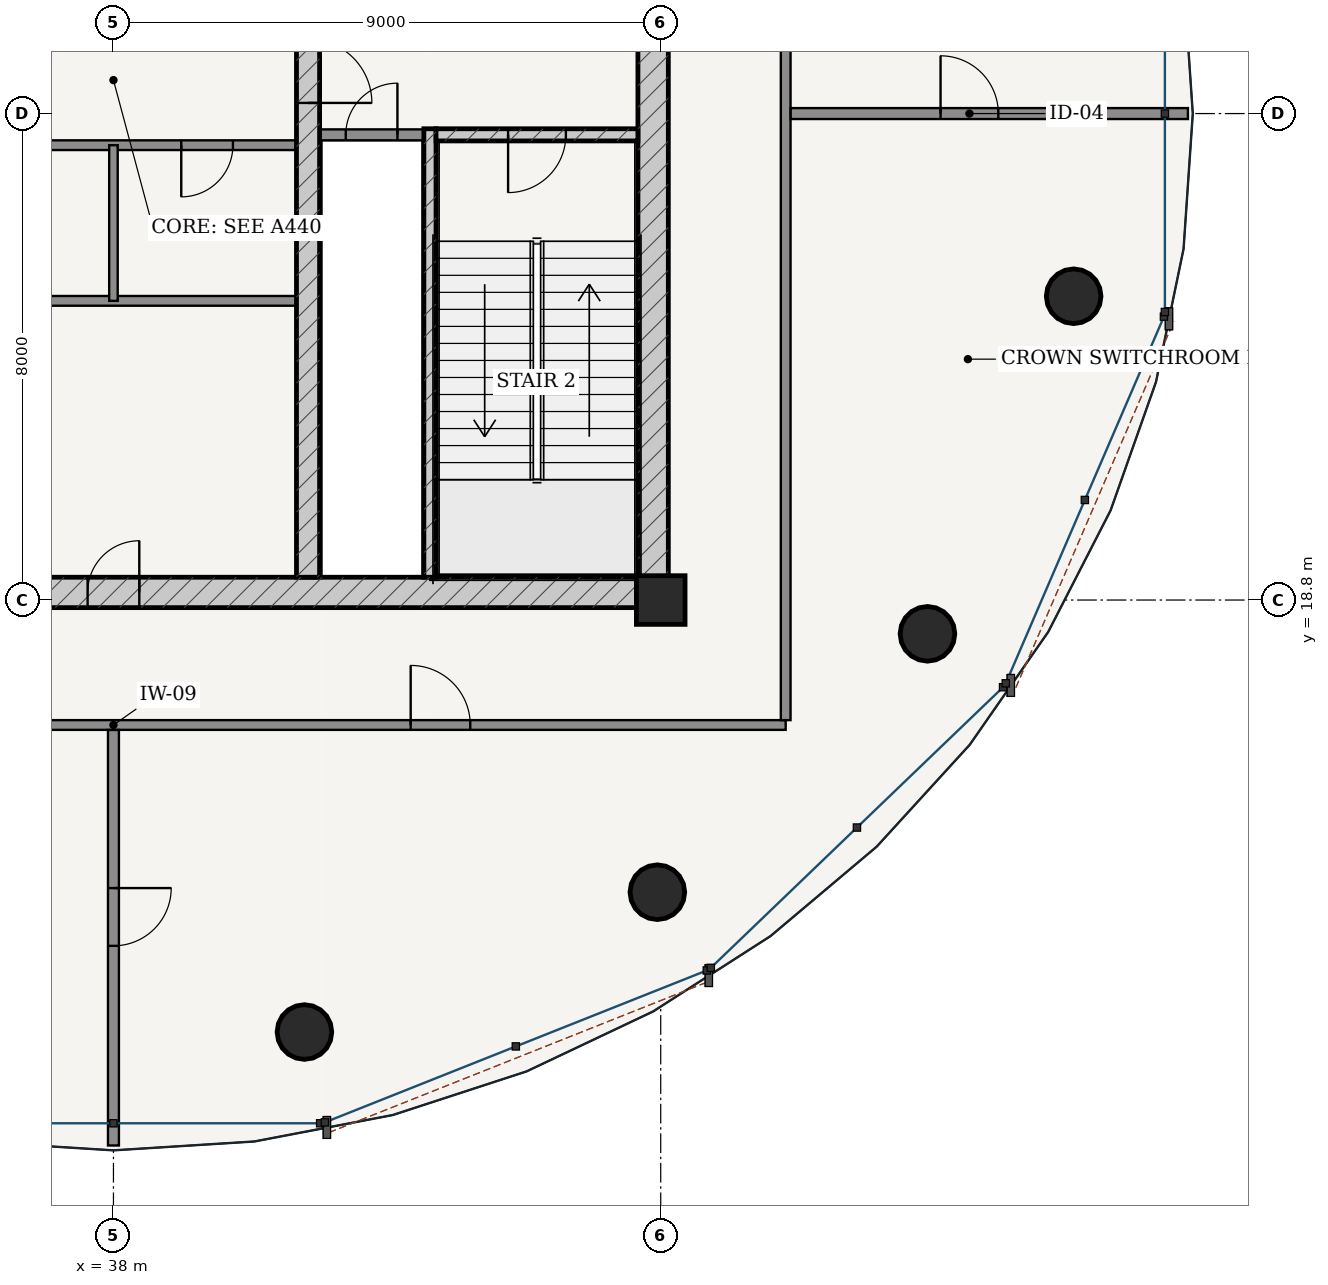
"""IFC4 building model, lengths in metres.
Left out: names, types, materials, properties, quantities, classifications, styles, units other than length and angle.
Written with IfcOpenShell. Run it as: python <this file> out.ifc"""

import sys

from ifc_helpers import new_model, si_unit, direction, frame, frame_2d, origin, origin_2d, place, context, subcontext, project, spatial, rectangle, hollow_circle, extrude, source, transform, mapped, element, fill, save


model = new_model("IFC4")
c1 = context("Model", 3, precision=1e-05, world=origin(), true_north=direction((-0.2419218956, 0.970295726276)))
c2 = subcontext(c1, "Body", "Model", "MODEL_VIEW")
j1 = project(units=[si_unit("LENGTHUNIT", "METRE"), si_unit("PLANEANGLEUNIT", "RADIAN")], contexts=[c1])
p1 = place(None, origin())
s1 = spatial("IfcSite", under=j1, at=p1, CompositionType="ELEMENT")
p2 = place(p1, origin())
s2 = spatial("IfcBuilding", under=s1, at=p2, CompositionType="ELEMENT")
p3 = place(p2, frame((0.0, 0.0, 311.3)))
s3 = spatial("IfcBuildingStorey", under=s2, at=p3, CompositionType="ELEMENT", Elevation=311.3)
p4 = place(p3, frame((47.0, 18.8, 0.0), z_axis=(0.0, 0.0, 1.0), x_axis=(1.0, 0.0, 0.0)))
e1 = element("IfcColumn", 1, at=p4, inside=s3, PredefinedType="COLUMN", context=c2, shape_type="SweptSolid", body=[
    extrude(rectangle(XDim=0.8, YDim=0.8, at=origin_2d()), origin(), (0.0, 0.0, 1.0), 5.2),
])
p5 = place(p3, frame((28.875, 18.925, 0.0), z_axis=(0.0, 0.0, 1.0), x_axis=(1.0, 0.0, 0.0)))
e2 = element("IfcWall", 2, at=p5, inside=s3, PredefinedType="SHEAR", context=c2, shape_type="SweptSolid", body=[
    extrude(rectangle(XDim=18.25, YDim=0.5, at=frame_2d((9.125, 0.0))), origin(), (0.0, 0.0, 1.0), 4.78),
])
p6 = place(p5, frame((8.7, 0.0, 0.0)))
e3 = element("IfcOpeningElement", 3, at=p6, cuts=e2, PredefinedType="OPENING", context=c2, shape_type="SweptSolid", body=[
    extrude(rectangle(XDim=0.85, YDim=2.1, at=frame_2d((0.425, 1.05))), frame((0.0, 0.26, 0.0), z_axis=(0.0, -1.0, 0.0), x_axis=(1.0, 0.0, 0.0)), (0.0, 0.0, 1.0), 0.52),
])
p7 = place(p3, frame((46.875, 19.175, 0.0), z_axis=(0.0, 0.0, 1.0), x_axis=(0.0, 1.0, 0.0)))
e4 = element("IfcWall", 4, at=p7, inside=s3, PredefinedType="SHEAR", context=c2, shape_type="SweptSolid", body=[
    extrude(rectangle(XDim=15.25, YDim=0.5, at=frame_2d((7.625, 0.0))), origin(), (0.0, 0.0, 1.0), 4.78),
])
p8 = place(p7, frame((9.875, 0.0, 0.0)))
e5 = element("IfcOpeningElement", 5, at=p8, cuts=e4, PredefinedType="OPENING", context=c2, shape_type="SweptSolid", body=[
    extrude(rectangle(XDim=1.5, YDim=2.2, at=frame_2d((0.75, 1.1))), frame((0.0, 0.26, 0.0), z_axis=(0.0, -1.0, 0.0), x_axis=(1.0, 0.0, 0.0)), (0.0, 0.0, 1.0), 0.52),
])
p9 = place(p3, frame((43.205, 19.175, 0.0), z_axis=(0.0, 0.0, 1.0), x_axis=(0.0, 1.0, 0.0)))
e6 = element("IfcWall", 6, at=p9, inside=s3, PredefinedType="SOLIDWALL", context=c2, shape_type="SweptSolid", body=[
    extrude(rectangle(XDim=7.375, YDim=0.2, at=frame_2d((3.688, 0.0))), origin(), (0.0, 0.0, 1.0), 4.78),
])
p10 = place(p3, frame((43.305, 26.45, 0.0), z_axis=(0.0, 0.0, 1.0), x_axis=(1.0, 0.0, 0.0)))
e7 = element("IfcWall", 7, at=p10, inside=s3, PredefinedType="SOLIDWALL", context=c2, shape_type="SweptSolid", body=[
    extrude(rectangle(XDim=3.32, YDim=0.2, at=frame_2d((1.66, 0.0))), origin(), (0.0, 0.0, 1.0), 4.78),
])
p11 = place(p10, frame((1.185, 0.0, 0.0)))
e8 = element("IfcOpeningElement", 8, at=p11, cuts=e7, PredefinedType="OPENING", context=c2, shape_type="SweptSolid", body=[
    extrude(rectangle(XDim=0.95, YDim=2.15, at=frame_2d((0.475, 1.075))), frame((0.0, 0.11, 0.0), z_axis=(0.0, -1.0, 0.0), x_axis=(1.0, 0.0, 0.0)), (0.0, 0.0, 1.0), 0.22),
])
p12 = place(p3, frame((41.2, 19.175, 0.0), z_axis=(0.0, 0.0, 1.0), x_axis=(0.0, 1.0, 0.0)))
e9 = element("IfcWall", 9, at=p12, inside=s3, PredefinedType="SHEAR", context=c2, shape_type="SweptSolid", body=[
    extrude(rectangle(XDim=15.25, YDim=0.38, at=frame_2d((7.625, 0.0))), origin(), (0.0, 0.0, 1.0), 4.78),
])
p13 = place(p12, frame((7.8, 0.0, 0.0)))
e10 = element("IfcOpeningElement", 10, at=p13, cuts=e9, PredefinedType="OPENING", context=c2, shape_type="SweptSolid", body=[
    extrude(rectangle(XDim=1.05, YDim=2.15, at=frame_2d((0.525, 1.075))), frame((0.0, 0.2, 0.0), z_axis=(0.0, -1.0, 0.0), x_axis=(1.0, 0.0, 0.0)), (0.0, 0.0, 1.0), 0.4),
])
for number, where, z_axis, x_axis in (
    (11, (41.141, 11.696, 0.0), (0.0, 0.0, 1.0), (1.0, 0.0, 0.0)),
    (12, (46.945, 13.995, 0.0), (0.0, 0.0, 1.0), (1.0, 0.0, 0.0)),
    (13, (51.387, 18.244, 0.0), (0.0, 0.0, 1.0), (1.0, 0.0, 0.0)),
    (14, (53.791, 23.796, 0.0), (0.0, 0.0, 1.0), (1.0, 0.0, 0.0)),
):
    element("IfcColumn", number, at=place(p3, frame(where, z_axis=z_axis, x_axis=x_axis)), inside=s3, PredefinedType="COLUMN", context=c2, shape_type="SweptSolid", body=[
        extrude(hollow_circle(Radius=0.45, WallThickness=0.032, at=origin_2d()), origin(), (0.0, 0.0, 1.0), 5.2),
    ])
p14 = place(p3, frame((41.39, 26.45, 0.0), z_axis=(0.0, 0.0, 1.0), x_axis=(1.0, 0.0, 0.0)))
e15 = element("IfcWall", 15, at=p14, inside=s3, PredefinedType="PARTITIONING", context=c2, shape_type="SweptSolid", body=[
    extrude(rectangle(XDim=1.71, YDim=0.18, at=frame_2d((0.855, 0.0))), origin(), (0.0, 0.0, 1.0), 4.78),
])
p15 = place(p14, frame((0.43, 0.0, 0.0)))
e16 = element("IfcOpeningElement", 16, at=p15, cuts=e15, PredefinedType="OPENING", context=c2, shape_type="SweptSolid", body=[
    extrude(rectangle(XDim=0.85, YDim=2.1, at=frame_2d((0.425, 1.05))), frame((0.0, 0.1, 0.0), z_axis=(0.0, -1.0, 0.0), x_axis=(1.0, 0.0, 0.0)), (0.0, 0.0, 1.0), 0.2),
])
p16 = place(p3, frame((34.99, 26.28, 0.0), z_axis=(0.0, 0.0, 1.0), x_axis=(1.0, 0.0, 0.0)))
e17 = element("IfcWall", 17, at=p16, inside=s3, PredefinedType="PARTITIONING", context=c2, shape_type="SweptSolid", body=[
    extrude(rectangle(XDim=6.02, YDim=0.16, at=frame_2d((3.01, 0.0))), origin(), (0.0, 0.0, 1.0), 4.78),
])
p17 = place(p16, frame((1.045, 0.0, 0.0)))
e18 = element("IfcOpeningElement", 18, at=p17, cuts=e17, PredefinedType="OPENING", context=c2, shape_type="SweptSolid", body=[
    extrude(rectangle(XDim=0.85, YDim=2.1, at=frame_2d((0.425, 1.05))), frame((0.0, 0.09, 0.0), z_axis=(0.0, -1.0, 0.0), x_axis=(1.0, 0.0, 0.0)), (0.0, 0.0, 1.0), 0.18),
])
p18 = place(p16, frame((4.125, 0.0, 0.0)))
e19 = element("IfcOpeningElement", 19, at=p18, cuts=e17, PredefinedType="OPENING", context=c2, shape_type="SweptSolid", body=[
    extrude(rectangle(XDim=0.85, YDim=2.1, at=frame_2d((0.425, 1.05))), frame((0.0, 0.09, 0.0), z_axis=(0.0, -1.0, 0.0), x_axis=(1.0, 0.0, 0.0)), (0.0, 0.0, 1.0), 0.18),
])
p19 = place(p3, frame((34.99, 23.72, 0.0), z_axis=(0.0, 0.0, 1.0), x_axis=(1.0, 0.0, 0.0)))
e20 = element("IfcWall", 20, at=p19, inside=s3, PredefinedType="PARTITIONING", context=c2, shape_type="SweptSolid", body=[
    extrude(rectangle(XDim=6.02, YDim=0.16, at=frame_2d((3.01, 0.0))), origin(), (0.0, 0.0, 1.0), 4.78),
])
p20 = place(p3, frame((38.0, 23.72, 0.0), z_axis=(0.0, 0.0, 1.0), x_axis=(0.0, 1.0, 0.0)))
e21 = element("IfcWall", 21, at=p20, inside=s3, PredefinedType="PARTITIONING", context=c2, shape_type="SweptSolid", body=[
    extrude(rectangle(XDim=2.56, YDim=0.14, at=frame_2d((1.28, 0.0))), origin(), (0.0, 0.0, 1.0), 4.78),
])
p21 = place(p3, frame((26.945, 16.745, 0.0), z_axis=(0.0, 0.0, 1.0), x_axis=(1.0, 0.0, 0.0)))
e22 = element("IfcWall", 22, at=p21, inside=s3, PredefinedType="PARTITIONING", context=c2, shape_type="SweptSolid", body=[
    extrude(rectangle(XDim=22.11, YDim=0.16, at=frame_2d((11.055, 0.0))), origin(), (0.0, 0.0, 1.0), 4.352),
])
p22 = place(p21, frame((5.187, 0.0, 0.0)))
e23 = element("IfcOpeningElement", 23, at=p22, cuts=e22, PredefinedType="OPENING", context=c2, shape_type="SweptSolid", body=[
    extrude(rectangle(XDim=0.98, YDim=2.2, at=frame_2d((0.49, 1.1))), frame((0.0, 0.09, 0.0), z_axis=(0.0, -1.0, 0.0), x_axis=(1.0, 0.0, 0.0)), (0.0, 0.0, 1.0), 0.18),
])
p23 = place(p21, frame((15.943, 0.0, 0.0)))
e24 = element("IfcOpeningElement", 24, at=p23, cuts=e22, PredefinedType="OPENING", context=c2, shape_type="SweptSolid", body=[
    extrude(rectangle(XDim=0.98, YDim=2.2, at=frame_2d((0.49, 1.1))), frame((0.0, 0.09, 0.0), z_axis=(0.0, -1.0, 0.0), x_axis=(1.0, 0.0, 0.0)), (0.0, 0.0, 1.0), 0.18),
])
p24 = place(p3, frame((49.055, 16.825, 0.0), z_axis=(0.0, 0.0, 1.0), x_axis=(0.0, 1.0, 0.0)))
e25 = element("IfcWall", 25, at=p24, inside=s3, PredefinedType="PARTITIONING", context=c2, shape_type="SweptSolid", body=[
    extrude(rectangle(XDim=19.95, YDim=0.16, at=frame_2d((9.975, 0.0))), origin(), (0.0, 0.0, 1.0), 4.352),
])
p25 = place(p3, frame((49.137, 26.8, 0.0), z_axis=(0.0, 0.0, 1.0), x_axis=(1.0, 0.0, 0.0)))
e26 = element("IfcWall", 26, at=p25, inside=s3, PredefinedType="PARTITIONING", context=c2, shape_type="SweptSolid", body=[
    extrude(rectangle(XDim=6.533, YDim=0.18, at=frame_2d((3.267, 0.0))), origin(), (0.0, 0.0, 1.0), 4.411),
])
p26 = place(p25, frame((2.465, 0.0, 0.0)))
e27 = element("IfcOpeningElement", 27, at=p26, cuts=e26, PredefinedType="OPENING", context=c2, shape_type="SweptSolid", body=[
    extrude(rectangle(XDim=0.95, YDim=2.15, at=frame_2d((0.475, 1.075))), frame((0.0, 0.1, 0.0), z_axis=(0.0, -1.0, 0.0), x_axis=(1.0, 0.0, 0.0)), (0.0, 0.0, 1.0), 0.2),
])
p27 = place(p3, frame((38.0, 16.663, 0.0), z_axis=(0.0, 0.0, 1.0), x_axis=(0.0, -1.0, 0.0)))
e28 = element("IfcWall", 28, at=p27, inside=s3, PredefinedType="PARTITIONING", context=c2, shape_type="SweptSolid", body=[
    extrude(rectangle(XDim=6.833, YDim=0.18, at=frame_2d((3.417, 0.0))), origin(), (0.0, 0.0, 1.0), 4.411),
])
p28 = place(p27, frame((2.6, 0.0, 0.0)))
e29 = element("IfcOpeningElement", 29, at=p28, cuts=e28, PredefinedType="OPENING", context=c2, shape_type="SweptSolid", body=[
    extrude(rectangle(XDim=0.95, YDim=2.15, at=frame_2d((0.475, 1.075))), frame((0.0, 0.1, 0.0), z_axis=(0.0, -1.0, 0.0), x_axis=(1.0, 0.0, 0.0)), (0.0, 0.0, 1.0), 0.2),
])
m1 = source(origin(), c2, "Body", "SweptSolid", [
    extrude(rectangle(XDim=1.05, YDim=2.15, at=frame_2d((0.525, 1.075))), frame((0.0, 0.025, 0.0), z_axis=(0.0, -1.0, 0.0), x_axis=(1.0, 0.0, 0.0)), (0.0, 0.0, 1.0), 0.05),
])
p29 = place(p13, frame((1.05, 0.0, 0.0), z_axis=(0.0, 0.0, 1.0), x_axis=(-1.0, 0.0, 0.0)))
e30 = element("IfcDoor", 30, at=p29, inside=s3, OperationType="SINGLE_SWING_RIGHT", PredefinedType="DOOR", context=c2, shape_type="MappedRepresentation", body=[
    mapped(m1, transform((0.0, 0.0, 0.0), scale=1.0)),
])
fill(e10, e30)
m2 = source(origin(), c2, "Body", "SweptSolid", [
    extrude(rectangle(XDim=0.95, YDim=2.15, at=frame_2d((0.475, 1.075))), frame((0.0, 0.025, 0.0), z_axis=(0.0, -1.0, 0.0), x_axis=(1.0, 0.0, 0.0)), (0.0, 0.0, 1.0), 0.05),
])
p30 = place(p11, frame((0.95, 0.0, 0.0), z_axis=(0.0, 0.0, 1.0), x_axis=(-1.0, 0.0, 0.0)))
e31 = element("IfcDoor", 31, at=p30, inside=s3, OperationType="SINGLE_SWING_RIGHT", PredefinedType="DOOR", context=c2, shape_type="MappedRepresentation", body=[
    mapped(m2, transform((0.0, 0.0, 0.0), scale=1.0)),
])
fill(e8, e31)
m3 = source(origin(), c2, "Body", "SweptSolid", [
    extrude(rectangle(XDim=0.85, YDim=2.1, at=frame_2d((0.425, 1.05))), frame((0.0, 0.025, 0.0), z_axis=(0.0, -1.0, 0.0), x_axis=(1.0, 0.0, 0.0)), (0.0, 0.0, 1.0), 0.05),
])
p31 = place(p15, origin())
e32 = element("IfcDoor", 32, at=p31, inside=s3, OperationType="SINGLE_SWING_RIGHT", PredefinedType="DOOR", context=c2, shape_type="MappedRepresentation", body=[
    mapped(m3, transform((0.0, 0.0, 0.0), scale=1.0)),
])
fill(e16, e32)
p32 = place(p18, frame((0.85, 0.0, 0.0), z_axis=(0.0, 0.0, 1.0), x_axis=(-1.0, 0.0, 0.0)))
e33 = element("IfcDoor", 33, at=p32, inside=s3, OperationType="SINGLE_SWING_RIGHT", PredefinedType="DOOR", context=c2, shape_type="MappedRepresentation", body=[
    mapped(m3, transform((0.0, 0.0, 0.0), scale=1.0)),
])
fill(e19, e33)
p33 = place(p6, origin())
e34 = element("IfcDoor", 34, at=p33, inside=s3, OperationType="SINGLE_SWING_RIGHT", PredefinedType="DOOR", context=c2, shape_type="MappedRepresentation", body=[
    mapped(m3, transform((0.0, 0.0, 0.0), scale=1.0)),
])
fill(e3, e34)
m4 = source(origin(), c2, "Body", "SweptSolid", [
    extrude(rectangle(XDim=0.98, YDim=2.2, at=frame_2d((0.49, 1.1))), frame((0.0, 0.025, 0.0), z_axis=(0.0, -1.0, 0.0), x_axis=(1.0, 0.0, 0.0)), (0.0, 0.0, 1.0), 0.05),
])
p34 = place(p23, origin())
e35 = element("IfcDoor", 35, at=p34, inside=s3, OperationType="SINGLE_SWING_LEFT", PredefinedType="DOOR", context=c2, shape_type="MappedRepresentation", body=[
    mapped(m4, transform((0.0, 0.0, 0.0), scale=1.0)),
])
fill(e24, e35)
p35 = place(p26, origin())
e36 = element("IfcDoor", 36, at=p35, inside=s3, OperationType="SINGLE_SWING_LEFT", PredefinedType="DOOR", context=c2, shape_type="MappedRepresentation", body=[
    mapped(m2, transform((0.0, 0.0, 0.0), scale=1.0)),
])
fill(e27, e36)
p36 = place(p28, origin())
e37 = element("IfcDoor", 37, at=p36, inside=s3, OperationType="SINGLE_SWING_LEFT", PredefinedType="DOOR", context=c2, shape_type="MappedRepresentation", body=[
    mapped(m2, transform((0.0, 0.0, 0.0), scale=1.0)),
])
fill(e29, e37)
save(model, sys.argv[1])
